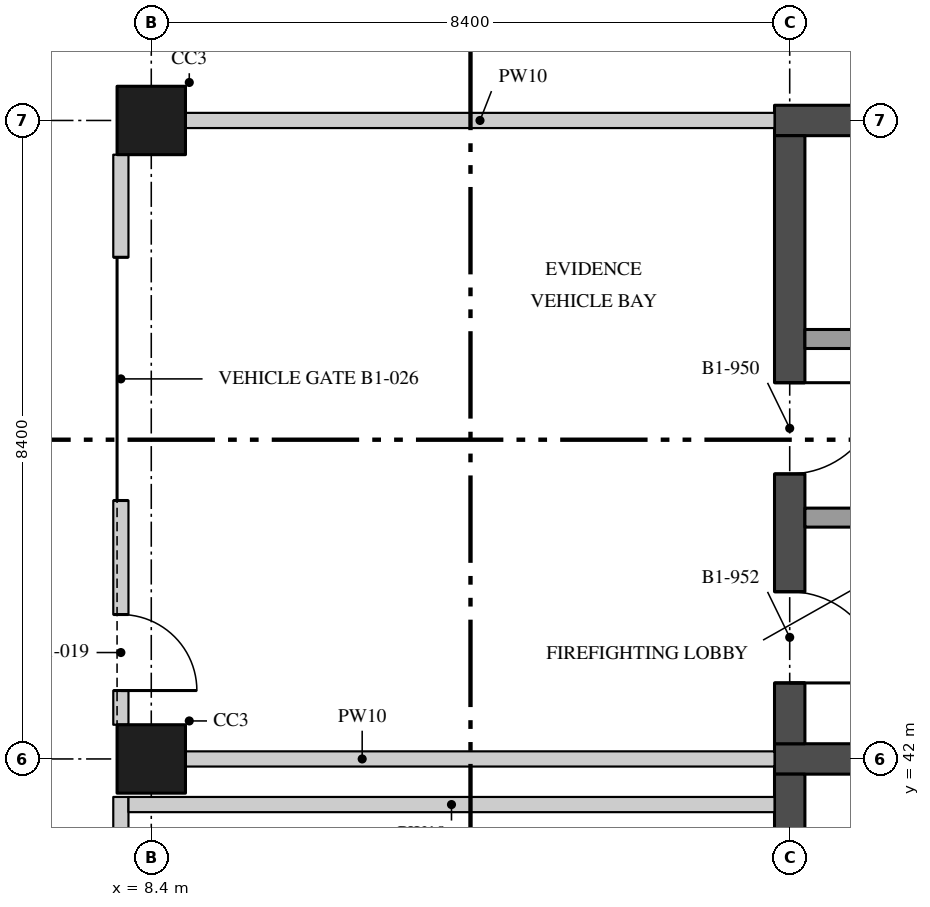
"""IFC4 building model, lengths in metres.
Left out: names, types, materials, properties, quantities, classifications, styles, units other than length and angle.
Written with IfcOpenShell. Run it as: python <this file> out.ifc"""

import sys

from ifc_helpers import new_model, si_unit, direction, frame, frame_2d, origin, origin_2d, place, context, subcontext, project, spatial, rectangle, extrude, element, fill, save


model = new_model("IFC4")
c1 = context("Model", 3, precision=1e-05, world=origin(), true_north=direction((0.0, 1.0)))
c2 = subcontext(c1, "Body", "Model", "MODEL_VIEW")
j1 = project(units=[si_unit("LENGTHUNIT", "METRE"), si_unit("PLANEANGLEUNIT", "RADIAN")], contexts=[c1])
p1 = place(None, origin())
s1 = spatial("IfcSite", under=j1, at=p1, CompositionType="ELEMENT")
p2 = place(p1, origin())
s2 = spatial("IfcBuilding", under=s1, at=p2, CompositionType="ELEMENT")
p3 = place(p2, frame((0.0, 0.0, -4.5)))
s3 = spatial("IfcBuildingStorey", under=s2, at=p3, CompositionType="ELEMENT", Elevation=-4.5)
for number, where, z_axis, x_axis in (
    (1, (8.4, 42.0, 0.0), (0.0, 0.0, 1.0), (1.0, 0.0, 0.0)),
    (2, (8.4, 50.4, 0.0), (0.0, 0.0, 1.0), (1.0, 0.0, 0.0)),
):
    element("IfcColumn", number, at=place(p3, frame(where, z_axis=z_axis, x_axis=x_axis)), inside=s3, PredefinedType="COLUMN", context=c2, shape_type="SweptSolid", body=[
        extrude(rectangle(XDim=0.9, YDim=0.9, at=origin_2d()), origin(), (0.0, 0.0, 1.0), 4.05),
    ])
p4 = place(p3, frame((16.6, 42.0, 0.0), z_axis=(0.0, 0.0, 1.0), x_axis=(1.0, 0.0, 0.0)))
e3 = element("IfcWall", 3, at=p4, inside=s3, PredefinedType="SHEAR", context=c2, shape_type="SweptSolid", body=[
    extrude(rectangle(XDim=8.8, YDim=0.4, at=frame_2d((4.4, 0.0))), origin(), (0.0, 0.0, 1.0), 4.05),
])
p5 = place(p4, frame((1.05, 0.0, 0.0)))
e4 = element("IfcOpeningElement", 4, at=p5, cuts=e3, PredefinedType="OPENING", context=c2, shape_type="SweptSolid", body=[
    extrude(rectangle(XDim=1.1, YDim=2.1, at=frame_2d((0.55, 1.05))), frame((0.0, 0.21, 0.0), z_axis=(0.0, -1.0, 0.0), x_axis=(1.0, 0.0, 0.0)), (0.0, 0.0, 1.0), 0.42),
])
p6 = place(p3, frame((16.6, 50.4, 0.0), z_axis=(0.0, 0.0, 1.0), x_axis=(1.0, 0.0, 0.0)))
e5 = element("IfcWall", 5, at=p6, inside=s3, PredefinedType="SHEAR", context=c2, shape_type="SweptSolid", body=[
    extrude(rectangle(XDim=8.8, YDim=0.4, at=frame_2d((4.4, 0.0))), origin(), (0.0, 0.0, 1.0), 4.05),
])
p7 = place(p3, frame((16.8, 42.2, 0.0), z_axis=(0.0, 0.0, 1.0), x_axis=(0.0, 1.0, 0.0)))
e6 = element("IfcWall", 6, at=p7, inside=s3, PredefinedType="SHEAR", context=c2, shape_type="SweptSolid", body=[
    extrude(rectangle(XDim=8.0, YDim=0.4, at=frame_2d((4.0, 0.0))), origin(), (0.0, 0.0, 1.0), 4.05),
])
p8 = place(p7, frame((3.55, 0.0, 0.0)))
e7 = element("IfcOpeningElement", 7, at=p8, cuts=e6, PredefinedType="OPENING", context=c2, shape_type="SweptSolid", body=[
    extrude(rectangle(XDim=1.2, YDim=2.1, at=frame_2d((0.6, 1.05))), frame((0.0, 0.21, 0.0), z_axis=(0.0, -1.0, 0.0), x_axis=(1.0, 0.0, 0.0)), (0.0, 0.0, 1.0), 0.42),
])
p9 = place(p7, frame((0.8, 0.0, 0.0)))
e8 = element("IfcOpeningElement", 8, at=p9, cuts=e6, PredefinedType="OPENING", context=c2, shape_type="SweptSolid", body=[
    extrude(rectangle(XDim=1.2, YDim=2.1, at=frame_2d((0.6, 1.05))), frame((0.0, 0.21, 0.0), z_axis=(0.0, -1.0, 0.0), x_axis=(1.0, 0.0, 0.0)), (0.0, 0.0, 1.0), 0.42),
])
p10 = place(p3, frame((21.7, 47.525, 0.0), z_axis=(0.0, 0.0, 1.0), x_axis=(-1.0, 0.0, 0.0)))
e9 = element("IfcWall", 9, at=p10, inside=s3, PredefinedType="SOLIDWALL", context=c2, shape_type="SweptSolid", body=[
    extrude(rectangle(XDim=4.7, YDim=0.25, at=frame_2d((2.35, 0.0))), origin(), (0.0, 0.0, 1.0), 4.05),
])
p11 = place(p10, frame((1.9, 0.0, 0.0)))
e10 = element("IfcOpeningElement", 10, at=p11, cuts=e9, PredefinedType="OPENING", context=c2, shape_type="SweptSolid", body=[
    extrude(rectangle(XDim=0.9, YDim=2.1, at=frame_2d((0.45, 1.05))), frame((0.0, 0.135, 0.0), z_axis=(0.0, -1.0, 0.0), x_axis=(1.0, 0.0, 0.0)), (0.0, 0.0, 1.0), 0.27),
])
p12 = place(p3, frame((19.65, 45.175, 0.0), z_axis=(0.0, 0.0, 1.0), x_axis=(-1.0, 0.0, 0.0)))
e11 = element("IfcWall", 11, at=p12, inside=s3, PredefinedType="SOLIDWALL", context=c2, shape_type="SweptSolid", body=[
    extrude(rectangle(XDim=2.65, YDim=0.25, at=frame_2d((1.325, 0.0))), origin(), (0.0, 0.0, 1.0), 4.05),
])
p13 = place(p3, frame((16.8, 33.8, 0.0), z_axis=(0.0, 0.0, 1.0), x_axis=(0.0, 1.0, 0.0)))
e12 = element("IfcWall", 12, at=p13, inside=s3, PredefinedType="SHEAR", context=c2, shape_type="SweptSolid", body=[
    extrude(rectangle(XDim=8.0, YDim=0.4, at=frame_2d((4.0, 0.0))), origin(), (0.0, 0.0, 1.0), 4.05),
])
p14 = place(p13, frame((3.875, 0.0, 0.0)))
e13 = element("IfcOpeningElement", 13, at=p14, cuts=e12, PredefinedType="OPENING", context=c2, shape_type="SweptSolid", body=[
    extrude(rectangle(XDim=1.2, YDim=2.1, at=frame_2d((0.6, 1.05))), frame((0.0, 0.21, 0.0), z_axis=(0.0, -1.0, 0.0), x_axis=(1.0, 0.0, 0.0)), (0.0, 0.0, 1.0), 0.42),
])
p15 = place(p3, frame((8.85, 50.4, 0.0), z_axis=(0.0, 0.0, 1.0), x_axis=(1.0, 0.0, 0.0)))
e14 = element("IfcWall", 14, at=p15, inside=s3, PredefinedType="PARTITIONING", context=c2, shape_type="SweptSolid", body=[
    extrude(rectangle(XDim=7.75, YDim=0.2, at=frame_2d((3.875, 0.0))), origin(), (0.0, 0.0, 1.0), 4.05),
])
p16 = place(p3, frame((8.0, 42.45, 0.0), z_axis=(0.0, 0.0, 1.0), x_axis=(0.0, 1.0, 0.0)))
e15 = element("IfcWall", 15, at=p16, inside=s3, PredefinedType="PARTITIONING", context=c2, shape_type="SweptSolid", body=[
    extrude(rectangle(XDim=7.5, YDim=0.2, at=frame_2d((3.75, 0.0))), origin(), (0.0, 0.0, 1.0), 4.05),
])
p17 = place(p16, frame((0.45, 0.0, 0.0)))
e16 = element("IfcOpeningElement", 16, at=p17, cuts=e15, PredefinedType="OPENING", context=c2, shape_type="SweptSolid", body=[
    extrude(rectangle(XDim=1.0, YDim=2.1, at=frame_2d((0.5, 1.05))), frame((0.0, 0.11, 0.0), z_axis=(0.0, -1.0, 0.0), x_axis=(1.0, 0.0, 0.0)), (0.0, 0.0, 1.0), 0.22),
])
p18 = place(p16, frame((2.95, 0.0, 0.0)))
e17 = element("IfcOpeningElement", 17, at=p18, cuts=e15, PredefinedType="OPENING", context=c2, shape_type="SweptSolid", body=[
    extrude(rectangle(XDim=3.2, YDim=3.0, at=frame_2d((1.6, 1.5))), frame((0.0, 0.11, 0.0), z_axis=(0.0, -1.0, 0.0), x_axis=(1.0, 0.0, 0.0)), (0.0, 0.0, 1.0), 0.22),
])
p19 = place(p3, frame((8.85, 42.0, 0.0), z_axis=(0.0, 0.0, 1.0), x_axis=(1.0, 0.0, 0.0)))
e18 = element("IfcWall", 18, at=p19, inside=s3, PredefinedType="PARTITIONING", context=c2, shape_type="SweptSolid", body=[
    extrude(rectangle(XDim=7.75, YDim=0.2, at=frame_2d((3.875, 0.0))), origin(), (0.0, 0.0, 1.0), 4.05),
])
p20 = place(p3, frame((8.0, 34.05, 0.0), z_axis=(0.0, 0.0, 1.0), x_axis=(0.0, 1.0, 0.0)))
e19 = element("IfcWall", 19, at=p20, inside=s3, PredefinedType="PARTITIONING", context=c2, shape_type="SweptSolid", body=[
    extrude(rectangle(XDim=7.45, YDim=0.2, at=frame_2d((3.725, 0.0))), origin(), (0.0, 0.0, 1.0), 4.05),
])
p21 = place(p3, frame((8.1, 41.4, 0.0), z_axis=(0.0, 0.0, 1.0), x_axis=(1.0, 0.0, 0.0)))
e20 = element("IfcWall", 20, at=p21, inside=s3, PredefinedType="PARTITIONING", context=c2, shape_type="SweptSolid", body=[
    extrude(rectangle(XDim=8.5, YDim=0.2, at=frame_2d((4.25, 0.0))), origin(), (0.0, 0.0, 1.0), 4.05),
])
p22 = place(p8, frame((1.2, 0.0, 0.0), z_axis=(0.0, 0.0, 1.0), x_axis=(-1.0, 0.0, 0.0)))
e21 = element("IfcDoor", 21, at=p22, inside=s3, OperationType="SINGLE_SWING_RIGHT", PredefinedType="DOOR", context=c2, shape_type="SweptSolid", body=[
    extrude(rectangle(XDim=1.2, YDim=2.1, at=frame_2d((0.6, 1.05))), frame((0.0, 0.035, 0.0), z_axis=(0.0, -1.0, 0.0), x_axis=(1.0, 0.0, 0.0)), (0.0, 0.0, 1.0), 0.07),
])
fill(e7, e21)
p23 = place(p9, frame((1.2, 0.0, 0.0), z_axis=(0.0, 0.0, 1.0), x_axis=(-1.0, 0.0, 0.0)))
e22 = element("IfcDoor", 22, at=p23, inside=s3, OperationType="SINGLE_SWING_LEFT", PredefinedType="DOOR", context=c2, shape_type="SweptSolid", body=[
    extrude(rectangle(XDim=1.2, YDim=2.1, at=frame_2d((0.6, 1.05))), frame((0.0, 0.035, 0.0), z_axis=(0.0, -1.0, 0.0), x_axis=(1.0, 0.0, 0.0)), (0.0, 0.0, 1.0), 0.07),
])
fill(e8, e22)
p24 = place(p17, frame((1.0, 0.0, 0.0), z_axis=(0.0, 0.0, 1.0), x_axis=(-1.0, 0.0, 0.0)))
e23 = element("IfcDoor", 23, at=p24, inside=s3, OperationType="SINGLE_SWING_LEFT", PredefinedType="DOOR", context=c2, shape_type="SweptSolid", body=[
    extrude(rectangle(XDim=1.0, YDim=2.1, at=frame_2d((0.5, 1.05))), frame((0.0, 0.045, 0.0), z_axis=(0.0, -1.0, 0.0), x_axis=(1.0, 0.0, 0.0)), (0.0, 0.0, 1.0), 0.09),
])
fill(e16, e23)
p25 = place(p18, origin())
e24 = element("IfcDoor", 24, at=p25, inside=s3, OperationType="SLIDING_TO_LEFT", PredefinedType="GATE", context=c2, shape_type="SweptSolid", body=[
    extrude(rectangle(XDim=3.2, YDim=3.0, at=frame_2d((1.6, 1.5))), frame((0.0, 0.025, 0.0), z_axis=(0.0, -1.0, 0.0), x_axis=(1.0, 0.0, 0.0)), (0.0, 0.0, 1.0), 0.05),
])
fill(e17, e24)
save(model, sys.argv[1])
